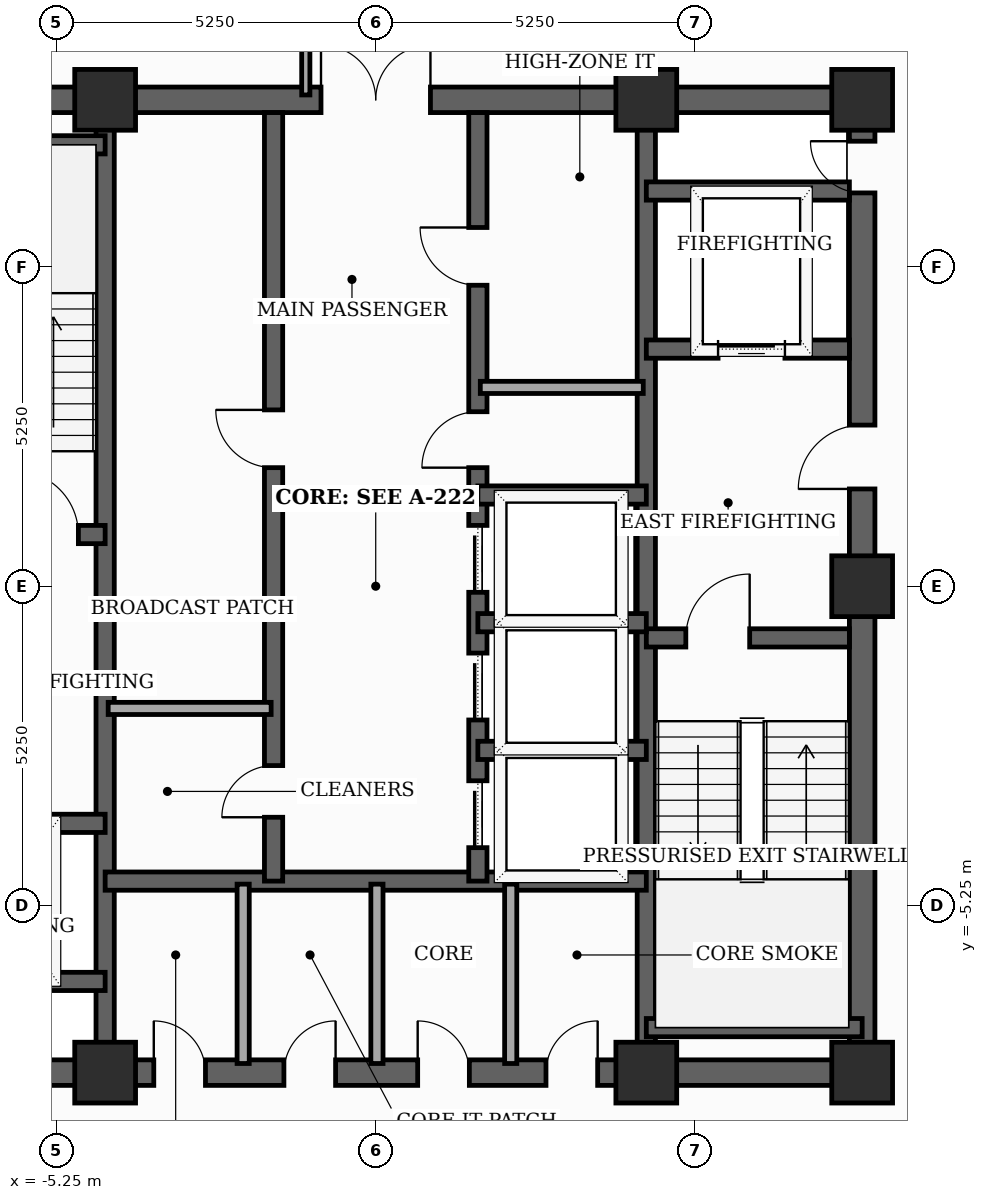
"""IFC4 building model, lengths in metres.
Left out: names, types, materials, properties, quantities, classifications, styles, units other than length and angle.
Written with IfcOpenShell. Run it as: python <this file> out.ifc"""

import sys

from ifc_helpers import new_model, si_unit, direction, frame, frame_2d, origin, origin_2d, place, context, subcontext, project, spatial, rectangle, extrude, element, fill, save


model = new_model("IFC4")
c1 = context("Model", 3, precision=1e-05, world=origin(), true_north=direction((0.0, 1.0)))
c2 = subcontext(c1, "Body", "Model", "MODEL_VIEW")
j1 = project(units=[si_unit("LENGTHUNIT", "METRE"), si_unit("PLANEANGLEUNIT", "RADIAN")], contexts=[c1])
p1 = place(None, origin())
s1 = spatial("IfcSite", under=j1, at=p1, CompositionType="ELEMENT")
p2 = place(p1, origin())
s2 = spatial("IfcBuilding", under=s1, at=p2, CompositionType="ELEMENT")
p3 = place(p2, frame((0.0, 0.0, 274.4)))
s3 = spatial("IfcBuildingStorey", under=s2, at=p3, CompositionType="ELEMENT", Elevation=274.4)
for number, where, z_axis, x_axis in (
    (1, (-4.45, -8.0, 0.0), (0.0, 0.0, 1.0), (1.0, 0.0, 0.0)),
    (2, (4.45, -8.0, 0.0), (0.0, 0.0, 1.0), (1.0, 0.0, 0.0)),
    (3, (8.0, -8.0, 0.0), (0.0, 0.0, 1.0), (1.0, 0.0, 0.0)),
    (4, (8.0, 0.0, 0.0), (0.0, 0.0, 1.0), (1.0, 0.0, 0.0)),
    (5, (8.0, 8.0, 0.0), (0.0, 0.0, 1.0), (1.0, 0.0, 0.0)),
    (6, (4.45, 8.0, 0.0), (0.0, 0.0, 1.0), (1.0, 0.0, 0.0)),
    (7, (-4.45, 8.0, 0.0), (0.0, 0.0, 1.0), (1.0, 0.0, 0.0)),
):
    element("IfcColumn", number, at=place(p3, frame(where, z_axis=z_axis, x_axis=x_axis)), inside=s3, PredefinedType="COLUMN", context=c2, shape_type="SweptSolid", body=[
        extrude(rectangle(XDim=1.0, YDim=1.0, at=origin_2d()), origin(), (0.0, 0.0, 1.0), 3.7),
    ])
p4 = place(p3, frame((8.0, -8.0, 0.0), z_axis=(0.0, 0.0, 1.0), x_axis=(0.0, 1.0, 0.0)))
e8 = element("IfcWall", 8, at=p4, inside=s3, PredefinedType="SHEAR", context=c2, shape_type="SweptSolid", body=[
    extrude(rectangle(XDim=16.0, YDim=0.42, at=frame_2d((8.0, 0.0))), origin(), (0.0, 0.0, 1.0), 3.46),
])
p5 = place(p4, frame((9.6, 0.0, 0.0)))
e9 = element("IfcOpeningElement", 9, at=p5, cuts=e8, PredefinedType="OPENING", context=c2, shape_type="SweptSolid", body=[
    extrude(rectangle(XDim=1.05, YDim=2.15, at=frame_2d((0.525, 1.075))), frame((0.0, 0.22, 0.0), z_axis=(0.0, -1.0, 0.0), x_axis=(1.0, 0.0, 0.0)), (0.0, 0.0, 1.0), 0.44),
])
p6 = place(p4, frame((14.469, 0.0, 0.0)))
e10 = element("IfcOpeningElement", 10, at=p6, cuts=e8, PredefinedType="OPENING", context=c2, shape_type="SweptSolid", body=[
    extrude(rectangle(XDim=0.85, YDim=2.02, at=frame_2d((0.425, 1.01))), frame((0.0, 0.22, 0.0), z_axis=(0.0, -1.0, 0.0), x_axis=(1.0, 0.0, 0.0)), (0.0, 0.0, 1.0), 0.44),
])
p7 = place(p3, frame((-8.0, -8.0, 0.0), z_axis=(0.0, 0.0, 1.0), x_axis=(1.0, 0.0, 0.0)))
e11 = element("IfcWall", 11, at=p7, inside=s3, PredefinedType="SHEAR", context=c2, shape_type="SweptSolid", body=[
    extrude(rectangle(XDim=16.0, YDim=0.42, at=frame_2d((8.0, 0.0))), origin(), (0.0, 0.0, 1.0), 3.46),
])
p8 = place(p7, frame((4.35, 0.0, 0.0)))
e12 = element("IfcOpeningElement", 12, at=p8, cuts=e11, PredefinedType="OPENING", context=c2, shape_type="SweptSolid", body=[
    extrude(rectangle(XDim=0.85, YDim=2.02, at=frame_2d((0.425, 1.01))), frame((0.0, 0.22, 0.0), z_axis=(0.0, -1.0, 0.0), x_axis=(1.0, 0.0, 0.0)), (0.0, 0.0, 1.0), 0.44),
])
p9 = place(p7, frame((6.49, 0.0, 0.0)))
e13 = element("IfcOpeningElement", 13, at=p9, cuts=e11, PredefinedType="OPENING", context=c2, shape_type="SweptSolid", body=[
    extrude(rectangle(XDim=0.85, YDim=2.02, at=frame_2d((0.425, 1.01))), frame((0.0, 0.22, 0.0), z_axis=(0.0, -1.0, 0.0), x_axis=(1.0, 0.0, 0.0)), (0.0, 0.0, 1.0), 0.44),
])
p10 = place(p7, frame((8.69, 0.0, 0.0)))
e14 = element("IfcOpeningElement", 14, at=p10, cuts=e11, PredefinedType="OPENING", context=c2, shape_type="SweptSolid", body=[
    extrude(rectangle(XDim=0.85, YDim=2.02, at=frame_2d((0.425, 1.01))), frame((0.0, 0.22, 0.0), z_axis=(0.0, -1.0, 0.0), x_axis=(1.0, 0.0, 0.0)), (0.0, 0.0, 1.0), 0.44),
])
p11 = place(p7, frame((10.8, 0.0, 0.0)))
e15 = element("IfcOpeningElement", 15, at=p11, cuts=e11, PredefinedType="OPENING", context=c2, shape_type="SweptSolid", body=[
    extrude(rectangle(XDim=0.85, YDim=2.02, at=frame_2d((0.425, 1.01))), frame((0.0, 0.22, 0.0), z_axis=(0.0, -1.0, 0.0), x_axis=(1.0, 0.0, 0.0)), (0.0, 0.0, 1.0), 0.44),
])
p12 = place(p3, frame((-8.0, 8.0, 0.0), z_axis=(0.0, 0.0, 1.0), x_axis=(1.0, 0.0, 0.0)))
e16 = element("IfcWall", 16, at=p12, inside=s3, PredefinedType="SHEAR", context=c2, shape_type="SweptSolid", body=[
    extrude(rectangle(XDim=16.0, YDim=0.42, at=frame_2d((8.0, 0.0))), origin(), (0.0, 0.0, 1.0), 3.46),
])
p13 = place(p12, frame((7.1, 0.0, 0.0)))
e17 = element("IfcOpeningElement", 17, at=p13, cuts=e16, PredefinedType="OPENING", context=c2, shape_type="SweptSolid", body=[
    extrude(rectangle(XDim=1.8, YDim=2.15, at=frame_2d((0.9, 1.075))), frame((0.0, 0.22, 0.0), z_axis=(0.0, -1.0, 0.0), x_axis=(1.0, 0.0, 0.0)), (0.0, 0.0, 1.0), 0.44),
])
for number, where, z_axis, x_axis in (
    (18, (-4.45, -7.79, 0.0), (0.0, 0.0, 1.0), (0.0, 1.0, 0.0)),
    (19, (4.45, -7.79, 0.0), (0.0, 0.0, 1.0), (0.0, 1.0, 0.0)),
):
    element("IfcWall", number, at=place(p3, frame(where, z_axis=z_axis, x_axis=x_axis)), inside=s3, PredefinedType="SHEAR", context=c2, shape_type="SweptSolid", body=[
        extrude(rectangle(XDim=15.58, YDim=0.3, at=frame_2d((7.79, 0.0))), origin(), (0.0, 0.0, 1.0), 3.46),
    ])
p14 = place(p3, frame((-7.79, 0.85, 0.0), z_axis=(0.0, 0.0, 1.0), x_axis=(1.0, 0.0, 0.0)))
e20 = element("IfcWall", 20, at=p14, inside=s3, PredefinedType="SHEAR", context=c2, shape_type="SweptSolid", body=[
    extrude(rectangle(XDim=3.34, YDim=0.3, at=frame_2d((1.67, 0.0))), origin(), (0.0, 0.0, 1.0), 3.46),
])
p15 = place(p14, frame((1.85, 0.0, 0.0)))
e21 = element("IfcOpeningElement", 21, at=p15, cuts=e20, PredefinedType="OPENING", context=c2, shape_type="SweptSolid", body=[
    extrude(rectangle(XDim=1.05, YDim=2.15, at=frame_2d((0.525, 1.075))), frame((0.0, 0.16, 0.0), z_axis=(0.0, -1.0, 0.0), x_axis=(1.0, 0.0, 0.0)), (0.0, 0.0, 1.0), 0.32),
])
p16 = place(p3, frame((-7.79, 7.26, 0.0), z_axis=(0.0, 0.0, 1.0), x_axis=(1.0, 0.0, 0.0)))
e22 = element("IfcWall", 22, at=p16, inside=s3, PredefinedType="SHEAR", context=c2, shape_type="SweptSolid", body=[
    extrude(rectangle(XDim=3.34, YDim=0.3, at=frame_2d((1.67, 0.0))), origin(), (0.0, 0.0, 1.0), 3.46),
])
p17 = place(p3, frame((4.45, -0.85, 0.0), z_axis=(0.0, 0.0, 1.0), x_axis=(1.0, 0.0, 0.0)))
e23 = element("IfcWall", 23, at=p17, inside=s3, PredefinedType="SHEAR", context=c2, shape_type="SweptSolid", body=[
    extrude(rectangle(XDim=3.34, YDim=0.3, at=frame_2d((1.67, 0.0))), origin(), (0.0, 0.0, 1.0), 3.46),
])
p18 = place(p17, frame((0.65, 0.0, 0.0)))
e24 = element("IfcOpeningElement", 24, at=p18, cuts=e23, PredefinedType="OPENING", context=c2, shape_type="SweptSolid", body=[
    extrude(rectangle(XDim=1.05, YDim=2.15, at=frame_2d((0.525, 1.075))), frame((0.0, 0.16, 0.0), z_axis=(0.0, -1.0, 0.0), x_axis=(1.0, 0.0, 0.0)), (0.0, 0.0, 1.0), 0.32),
])
p19 = place(p3, frame((4.45, -7.26, 0.0), z_axis=(0.0, 0.0, 1.0), x_axis=(1.0, 0.0, 0.0)))
e25 = element("IfcWall", 25, at=p19, inside=s3, PredefinedType="SHEAR", context=c2, shape_type="SweptSolid", body=[
    extrude(rectangle(XDim=3.55, YDim=0.3, at=frame_2d((1.775, 0.0))), origin(), (0.0, 0.0, 1.0), 3.46),
])
p20 = place(p3, frame((-7.79, -3.9, 0.0), z_axis=(0.0, 0.0, 1.0), x_axis=(1.0, 0.0, 0.0)))
e26 = element("IfcWall", 26, at=p20, inside=s3, PredefinedType="SHEAR", context=c2, shape_type="SweptSolid", body=[
    extrude(rectangle(XDim=3.34, YDim=0.3, at=frame_2d((1.67, 0.0))), origin(), (0.0, 0.0, 1.0), 3.46),
])
p21 = place(p20, frame((1.27, 0.0, 0.0)))
e27 = element("IfcOpeningElement", 27, at=p21, cuts=e26, PredefinedType="OPENING", context=c2, shape_type="SweptSolid", body=[
    extrude(rectangle(XDim=1.1, YDim=2.1, at=frame_2d((0.55, 1.05))), frame((0.0, 0.16, 0.0), z_axis=(0.0, -1.0, 0.0), x_axis=(1.0, 0.0, 0.0)), (0.0, 0.0, 1.0), 0.32),
])
p22 = place(p3, frame((-7.79, -6.5, 0.0), z_axis=(0.0, 0.0, 1.0), x_axis=(1.0, 0.0, 0.0)))
e28 = element("IfcWall", 28, at=p22, inside=s3, PredefinedType="SHEAR", context=c2, shape_type="SweptSolid", body=[
    extrude(rectangle(XDim=3.34, YDim=0.3, at=frame_2d((1.67, 0.0))), origin(), (0.0, 0.0, 1.0), 3.46),
])
p23 = place(p3, frame((4.45, 3.9, 0.0), z_axis=(0.0, 0.0, 1.0), x_axis=(1.0, 0.0, 0.0)))
e29 = element("IfcWall", 29, at=p23, inside=s3, PredefinedType="SHEAR", context=c2, shape_type="SweptSolid", body=[
    extrude(rectangle(XDim=3.34, YDim=0.3, at=frame_2d((1.67, 0.0))), origin(), (0.0, 0.0, 1.0), 3.46),
])
p24 = place(p23, frame((1.18, 0.0, 0.0)))
e30 = element("IfcOpeningElement", 30, at=p24, cuts=e29, PredefinedType="OPENING", context=c2, shape_type="SweptSolid", body=[
    extrude(rectangle(XDim=1.1, YDim=2.1, at=frame_2d((0.55, 1.05))), frame((0.0, 0.16, 0.0), z_axis=(0.0, -1.0, 0.0), x_axis=(1.0, 0.0, 0.0)), (0.0, 0.0, 1.0), 0.32),
])
p25 = place(p3, frame((4.45, 6.5, 0.0), z_axis=(0.0, 0.0, 1.0), x_axis=(1.0, 0.0, 0.0)))
e31 = element("IfcWall", 31, at=p25, inside=s3, PredefinedType="SHEAR", context=c2, shape_type="SweptSolid", body=[
    extrude(rectangle(XDim=3.34, YDim=0.3, at=frame_2d((1.67, 0.0))), origin(), (0.0, 0.0, 1.0), 3.46),
])
p26 = place(p3, frame((-4.45, -4.85, 0.0), z_axis=(0.0, 0.0, 1.0), x_axis=(1.0, 0.0, 0.0)))
e32 = element("IfcWall", 32, at=p26, inside=s3, PredefinedType="SHEAR", context=c2, shape_type="SweptSolid", body=[
    extrude(rectangle(XDim=8.9, YDim=0.3, at=frame_2d((4.45, 0.0))), origin(), (0.0, 0.0, 1.0), 3.46),
])
p27 = place(p3, frame((-1.68, -4.85, 0.0), z_axis=(0.0, 0.0, 1.0), x_axis=(0.0, 1.0, 0.0)))
e33 = element("IfcWall", 33, at=p27, inside=s3, PredefinedType="SHEAR", context=c2, shape_type="SweptSolid", body=[
    extrude(rectangle(XDim=12.64, YDim=0.3, at=frame_2d((6.32, 0.0))), origin(), (0.0, 0.0, 1.0), 3.46),
])
p28 = place(p27, frame((1.05, 0.0, 0.0)))
e34 = element("IfcOpeningElement", 34, at=p28, cuts=e33, PredefinedType="OPENING", context=c2, shape_type="SweptSolid", body=[
    extrude(rectangle(XDim=0.85, YDim=2.02, at=frame_2d((0.425, 1.01))), frame((0.0, 0.16, 0.0), z_axis=(0.0, -1.0, 0.0), x_axis=(1.0, 0.0, 0.0)), (0.0, 0.0, 1.0), 0.32),
])
p29 = place(p27, frame((6.8, 0.0, 0.0)))
e35 = element("IfcOpeningElement", 35, at=p29, cuts=e33, PredefinedType="OPENING", context=c2, shape_type="SweptSolid", body=[
    extrude(rectangle(XDim=0.95, YDim=2.1, at=frame_2d((0.475, 1.05))), frame((0.0, 0.16, 0.0), z_axis=(0.0, -1.0, 0.0), x_axis=(1.0, 0.0, 0.0)), (0.0, 0.0, 1.0), 0.32),
])
p30 = place(p3, frame((1.68, -4.85, 0.0), z_axis=(0.0, 0.0, 1.0), x_axis=(0.0, 1.0, 0.0)))
e36 = element("IfcWall", 36, at=p30, inside=s3, PredefinedType="SHEAR", context=c2, shape_type="SweptSolid", body=[
    extrude(rectangle(XDim=12.64, YDim=0.3, at=frame_2d((6.32, 0.0))), origin(), (0.0, 0.0, 1.0), 3.46),
])
p31 = place(p30, frame((0.55, 0.0, 0.0)))
e37 = element("IfcOpeningElement", 37, at=p31, cuts=e36, PredefinedType="OPENING", context=c2, shape_type="SweptSolid", body=[
    extrude(rectangle(XDim=1.1, YDim=2.1, at=frame_2d((0.55, 1.05))), frame((0.0, 0.16, 0.0), z_axis=(0.0, -1.0, 0.0), x_axis=(1.0, 0.0, 0.0)), (0.0, 0.0, 1.0), 0.32),
])
p32 = place(p30, frame((2.65, 0.0, 0.0)))
e38 = element("IfcOpeningElement", 38, at=p32, cuts=e36, PredefinedType="OPENING", context=c2, shape_type="SweptSolid", body=[
    extrude(rectangle(XDim=1.1, YDim=2.1, at=frame_2d((0.55, 1.05))), frame((0.0, 0.16, 0.0), z_axis=(0.0, -1.0, 0.0), x_axis=(1.0, 0.0, 0.0)), (0.0, 0.0, 1.0), 0.32),
])
p33 = place(p30, frame((4.75, 0.0, 0.0)))
e39 = element("IfcOpeningElement", 39, at=p33, cuts=e36, PredefinedType="OPENING", context=c2, shape_type="SweptSolid", body=[
    extrude(rectangle(XDim=1.1, YDim=2.1, at=frame_2d((0.55, 1.05))), frame((0.0, 0.16, 0.0), z_axis=(0.0, -1.0, 0.0), x_axis=(1.0, 0.0, 0.0)), (0.0, 0.0, 1.0), 0.32),
])
p34 = place(p30, frame((6.8, 0.0, 0.0)))
e40 = element("IfcOpeningElement", 40, at=p34, cuts=e36, PredefinedType="OPENING", context=c2, shape_type="SweptSolid", body=[
    extrude(rectangle(XDim=0.92, YDim=2.1, at=frame_2d((0.46, 1.05))), frame((0.0, 0.16, 0.0), z_axis=(0.0, -1.0, 0.0), x_axis=(1.0, 0.0, 0.0)), (0.0, 0.0, 1.0), 0.32),
])
p35 = place(p30, frame((9.8, 0.0, 0.0)))
e41 = element("IfcOpeningElement", 41, at=p35, cuts=e36, PredefinedType="OPENING", context=c2, shape_type="SweptSolid", body=[
    extrude(rectangle(XDim=0.95, YDim=2.1, at=frame_2d((0.475, 1.05))), frame((0.0, 0.16, 0.0), z_axis=(0.0, -1.0, 0.0), x_axis=(1.0, 0.0, 0.0)), (0.0, 0.0, 1.0), 0.32),
])
for number, where, z_axis, x_axis in (
    (42, (1.68, 1.5, 0.0), (0.0, 0.0, 1.0), (1.0, 0.0, 0.0)),
    (43, (1.68, -2.7, 0.0), (0.0, 0.0, 1.0), (1.0, 0.0, 0.0)),
    (44, (1.68, -0.6, 0.0), (0.0, 0.0, 1.0), (1.0, 0.0, 0.0)),
):
    element("IfcWall", number, at=place(p3, frame(where, z_axis=z_axis, x_axis=x_axis)), inside=s3, PredefinedType="SHEAR", context=c2, shape_type="SweptSolid", body=[
        extrude(rectangle(XDim=2.77, YDim=0.3, at=frame_2d((1.385, 0.0))), origin(), (0.0, 0.0, 1.0), 3.46),
    ])
for number, where, z_axis, x_axis in (
    (45, (-2.18, -7.85, 0.0), (0.0, 0.0, 1.0), (0.0, 1.0, 0.0)),
    (46, (0.02, -7.85, 0.0), (0.0, 0.0, 1.0), (0.0, 1.0, 0.0)),
    (47, (2.22, -7.85, 0.0), (0.0, 0.0, 1.0), (0.0, 1.0, 0.0)),
):
    element("IfcWall", number, at=place(p3, frame(where, z_axis=z_axis, x_axis=x_axis)), inside=s3, PredefinedType="SOLIDWALL", context=c2, shape_type="SweptSolid", body=[
        extrude(rectangle(XDim=2.95, YDim=0.2, at=frame_2d((1.475, 0.0))), origin(), (0.0, 0.0, 1.0), 2.845),
    ])
for number, where, z_axis, x_axis in (
    (48, (-4.4, -2.01, 0.0), (0.0, 0.0, 1.0), (1.0, 0.0, 0.0)),
    (49, (1.72, 3.27, 0.0), (0.0, 0.0, 1.0), (1.0, 0.0, 0.0)),
):
    element("IfcWall", number, at=place(p3, frame(where, z_axis=z_axis, x_axis=x_axis)), inside=s3, PredefinedType="SOLIDWALL", context=c2, shape_type="SweptSolid", body=[
        extrude(rectangle(XDim=2.68, YDim=0.2, at=frame_2d((1.34, 0.0))), origin(), (0.0, 0.0, 1.0), 3.46),
    ])
p36 = place(p3, frame((-1.15, 10.65, 0.0), z_axis=(0.0, 0.0, 1.0), x_axis=(0.0, -1.0, 0.0)))
e50 = element("IfcWall", 50, at=p36, inside=s3, PredefinedType="PARTITIONING", context=c2, shape_type="SweptSolid", body=[
    extrude(rectangle(XDim=2.57, YDim=0.135, at=frame_2d((1.285, 0.0))), origin(), (0.0, 0.0, 1.0), 2.845),
])
p37 = place(p5, origin())
e51 = element("IfcDoor", 51, at=p37, inside=s3, OperationType="SINGLE_SWING_LEFT", PredefinedType="DOOR", context=c2, shape_type="SweptSolid", body=[
    extrude(rectangle(XDim=1.05, YDim=2.15, at=frame_2d((0.525, 1.075))), frame((0.0, 0.025, 0.0), z_axis=(0.0, -1.0, 0.0), x_axis=(1.0, 0.0, 0.0)), (0.0, 0.0, 1.0), 0.05),
])
fill(e9, e51)
p38 = place(p6, origin())
e52 = element("IfcDoor", 52, at=p38, inside=s3, OperationType="SINGLE_SWING_RIGHT", PredefinedType="TRAPDOOR", context=c2, shape_type="SweptSolid", body=[
    extrude(rectangle(XDim=0.85, YDim=2.02, at=frame_2d((0.425, 1.01))), frame((0.0, 0.025, 0.0), z_axis=(0.0, -1.0, 0.0), x_axis=(1.0, 0.0, 0.0)), (0.0, 0.0, 1.0), 0.05),
])
fill(e10, e52)
p39 = place(p8, origin())
e53 = element("IfcDoor", 53, at=p39, inside=s3, OperationType="SINGLE_SWING_LEFT", PredefinedType="TRAPDOOR", context=c2, shape_type="SweptSolid", body=[
    extrude(rectangle(XDim=0.85, YDim=2.02, at=frame_2d((0.425, 1.01))), frame((0.0, 0.025, 0.0), z_axis=(0.0, -1.0, 0.0), x_axis=(1.0, 0.0, 0.0)), (0.0, 0.0, 1.0), 0.05),
])
fill(e12, e53)
p40 = place(p9, origin())
e54 = element("IfcDoor", 54, at=p40, inside=s3, OperationType="SINGLE_SWING_RIGHT", PredefinedType="TRAPDOOR", context=c2, shape_type="SweptSolid", body=[
    extrude(rectangle(XDim=0.85, YDim=2.02, at=frame_2d((0.425, 1.01))), frame((0.0, 0.025, 0.0), z_axis=(0.0, -1.0, 0.0), x_axis=(1.0, 0.0, 0.0)), (0.0, 0.0, 1.0), 0.05),
])
fill(e13, e54)
p41 = place(p10, origin())
e55 = element("IfcDoor", 55, at=p41, inside=s3, OperationType="SINGLE_SWING_LEFT", PredefinedType="TRAPDOOR", context=c2, shape_type="SweptSolid", body=[
    extrude(rectangle(XDim=0.85, YDim=2.02, at=frame_2d((0.425, 1.01))), frame((0.0, 0.025, 0.0), z_axis=(0.0, -1.0, 0.0), x_axis=(1.0, 0.0, 0.0)), (0.0, 0.0, 1.0), 0.05),
])
fill(e14, e55)
p42 = place(p11, origin())
e56 = element("IfcDoor", 56, at=p42, inside=s3, OperationType="SINGLE_SWING_RIGHT", PredefinedType="TRAPDOOR", context=c2, shape_type="SweptSolid", body=[
    extrude(rectangle(XDim=0.85, YDim=2.02, at=frame_2d((0.425, 1.01))), frame((0.0, 0.025, 0.0), z_axis=(0.0, -1.0, 0.0), x_axis=(1.0, 0.0, 0.0)), (0.0, 0.0, 1.0), 0.05),
])
fill(e15, e56)
p43 = place(p13, origin())
e57 = element("IfcDoor", 57, at=p43, inside=s3, OperationType="DOUBLE_DOOR_SINGLE_SWING", PredefinedType="DOOR", context=c2, shape_type="SweptSolid", body=[
    extrude(rectangle(XDim=1.8, YDim=2.15, at=frame_2d((0.9, 1.075))), frame((0.0, 0.025, 0.0), z_axis=(0.0, -1.0, 0.0), x_axis=(1.0, 0.0, 0.0)), (0.0, 0.0, 1.0), 0.05),
])
fill(e17, e57)
p44 = place(p15, origin())
e58 = element("IfcDoor", 58, at=p44, inside=s3, OperationType="SINGLE_SWING_LEFT", PredefinedType="DOOR", context=c2, shape_type="SweptSolid", body=[
    extrude(rectangle(XDim=1.05, YDim=2.15, at=frame_2d((0.525, 1.075))), frame((0.0, 0.025, 0.0), z_axis=(0.0, -1.0, 0.0), x_axis=(1.0, 0.0, 0.0)), (0.0, 0.0, 1.0), 0.05),
])
fill(e21, e58)
p45 = place(p18, origin())
e59 = element("IfcDoor", 59, at=p45, inside=s3, OperationType="SINGLE_SWING_RIGHT", PredefinedType="DOOR", context=c2, shape_type="SweptSolid", body=[
    extrude(rectangle(XDim=1.05, YDim=2.15, at=frame_2d((0.525, 1.075))), frame((0.0, 0.025, 0.0), z_axis=(0.0, -1.0, 0.0), x_axis=(1.0, 0.0, 0.0)), (0.0, 0.0, 1.0), 0.05),
])
fill(e24, e59)
p46 = place(p24, origin())
e60 = element("IfcDoor", 60, at=p46, inside=s3, OperationType="SLIDING_TO_LEFT", PredefinedType="DOOR", context=c2, shape_type="SweptSolid", body=[
    extrude(rectangle(XDim=1.1, YDim=2.1, at=frame_2d((0.55, 1.05))), frame((0.0, 0.025, 0.0), z_axis=(0.0, -1.0, 0.0), x_axis=(1.0, 0.0, 0.0)), (0.0, 0.0, 1.0), 0.05),
])
fill(e30, e60)
p47 = place(p28, origin())
e61 = element("IfcDoor", 61, at=p47, inside=s3, OperationType="SINGLE_SWING_LEFT", PredefinedType="TRAPDOOR", context=c2, shape_type="SweptSolid", body=[
    extrude(rectangle(XDim=0.85, YDim=2.02, at=frame_2d((0.425, 1.01))), frame((0.0, 0.025, 0.0), z_axis=(0.0, -1.0, 0.0), x_axis=(1.0, 0.0, 0.0)), (0.0, 0.0, 1.0), 0.05),
])
fill(e34, e61)
p48 = place(p29, origin())
e62 = element("IfcDoor", 62, at=p48, inside=s3, OperationType="SINGLE_SWING_RIGHT", PredefinedType="DOOR", context=c2, shape_type="SweptSolid", body=[
    extrude(rectangle(XDim=0.95, YDim=2.1, at=frame_2d((0.475, 1.05))), frame((0.0, 0.025, 0.0), z_axis=(0.0, -1.0, 0.0), x_axis=(1.0, 0.0, 0.0)), (0.0, 0.0, 1.0), 0.05),
])
fill(e35, e62)
p49 = place(p31, origin())
e63 = element("IfcDoor", 63, at=p49, inside=s3, OperationType="SLIDING_TO_LEFT", PredefinedType="DOOR", context=c2, shape_type="SweptSolid", body=[
    extrude(rectangle(XDim=1.1, YDim=2.1, at=frame_2d((0.55, 1.05))), frame((0.0, 0.025, 0.0), z_axis=(0.0, -1.0, 0.0), x_axis=(1.0, 0.0, 0.0)), (0.0, 0.0, 1.0), 0.05),
])
fill(e37, e63)
p50 = place(p32, origin())
e64 = element("IfcDoor", 64, at=p50, inside=s3, OperationType="SLIDING_TO_LEFT", PredefinedType="DOOR", context=c2, shape_type="SweptSolid", body=[
    extrude(rectangle(XDim=1.1, YDim=2.1, at=frame_2d((0.55, 1.05))), frame((0.0, 0.025, 0.0), z_axis=(0.0, -1.0, 0.0), x_axis=(1.0, 0.0, 0.0)), (0.0, 0.0, 1.0), 0.05),
])
fill(e38, e64)
p51 = place(p33, origin())
e65 = element("IfcDoor", 65, at=p51, inside=s3, OperationType="SLIDING_TO_LEFT", PredefinedType="DOOR", context=c2, shape_type="SweptSolid", body=[
    extrude(rectangle(XDim=1.1, YDim=2.1, at=frame_2d((0.55, 1.05))), frame((0.0, 0.025, 0.0), z_axis=(0.0, -1.0, 0.0), x_axis=(1.0, 0.0, 0.0)), (0.0, 0.0, 1.0), 0.05),
])
fill(e39, e65)
p52 = place(p34, origin())
e66 = element("IfcDoor", 66, at=p52, inside=s3, OperationType="SINGLE_SWING_LEFT", PredefinedType="DOOR", context=c2, shape_type="SweptSolid", body=[
    extrude(rectangle(XDim=0.92, YDim=2.1, at=frame_2d((0.46, 1.05))), frame((0.0, 0.025, 0.0), z_axis=(0.0, -1.0, 0.0), x_axis=(1.0, 0.0, 0.0)), (0.0, 0.0, 1.0), 0.05),
])
fill(e40, e66)
p53 = place(p35, origin())
e67 = element("IfcDoor", 67, at=p53, inside=s3, OperationType="SINGLE_SWING_RIGHT", PredefinedType="DOOR", context=c2, shape_type="SweptSolid", body=[
    extrude(rectangle(XDim=0.95, YDim=2.1, at=frame_2d((0.475, 1.05))), frame((0.0, 0.025, 0.0), z_axis=(0.0, -1.0, 0.0), x_axis=(1.0, 0.0, 0.0)), (0.0, 0.0, 1.0), 0.05),
])
fill(e41, e67)
save(model, sys.argv[1])
